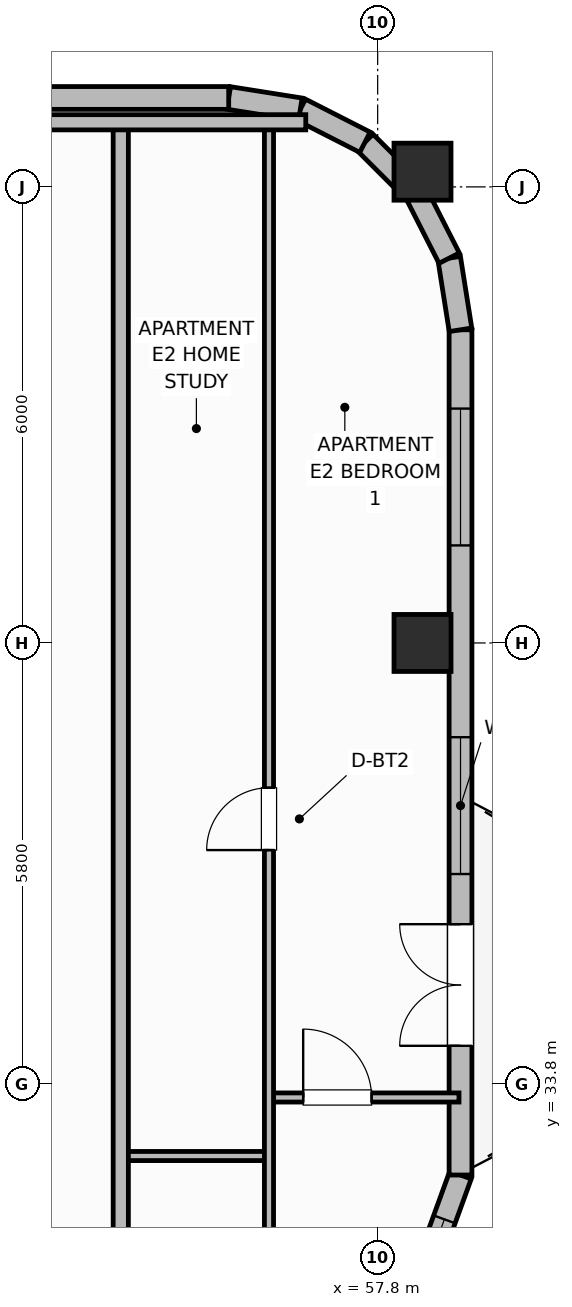
"""IFC4 building model, lengths in metres.
Left out: names, types, materials, properties, quantities, classifications, styles, units other than length and angle.
Written with IfcOpenShell. Run it as: python <this file> out.ifc"""

import sys

from ifc_helpers import new_model, si_unit, direction, frame, frame_2d, origin, origin_2d, place, context, subcontext, project, spatial, rectangle, extrude, element, fill, save


model = new_model("IFC4")
c1 = context("Model", 3, precision=1e-05, world=origin(), true_north=direction((0.0, 1.0)))
c2 = subcontext(c1, "Body", "Model", "MODEL_VIEW")
j1 = project(units=[si_unit("LENGTHUNIT", "METRE"), si_unit("PLANEANGLEUNIT", "RADIAN")], contexts=[c1])
p1 = place(None, origin())
s1 = spatial("IfcSite", under=j1, at=p1, CompositionType="ELEMENT")
p2 = place(p1, origin())
s2 = spatial("IfcBuilding", under=s1, at=p2, CompositionType="ELEMENT")
p3 = place(p2, frame((0.0, 0.0, 271.3)))
s3 = spatial("IfcBuildingStorey", under=s2, at=p3, CompositionType="ELEMENT", Elevation=271.3)
for number, where, z_axis, x_axis in (
    (1, (58.39, 39.6, 0.0), (0.0, 0.0, 1.0), (1.0, 0.0, 0.0)),
    (2, (58.39, 45.8, 0.0), (0.0, 0.0, 1.0), (1.0, 0.0, 0.0)),
):
    element("IfcColumn", number, at=place(p3, frame(where, z_axis=z_axis, x_axis=x_axis)), inside=s3, PredefinedType="COLUMN", context=c2, shape_type="SweptSolid", body=[
        extrude(rectangle(XDim=0.75, YDim=0.75, at=origin_2d()), origin(), (0.0, 0.0, 1.0), 3.7),
    ])
p4 = place(p3, frame((58.09, 30.4, 0.0), z_axis=(0.0, 0.0, 1.0), x_axis=(0.341642580708, 0.939829956453, 0.0)))
e3 = element("IfcWall", 3, at=p4, inside=s3, PredefinedType="SOLIDWALL", context=c2, shape_type="SweptSolid", body=[
    extrude(rectangle(XDim=2.341, YDim=0.3, at=frame_2d((1.17, 0.0))), origin(), (0.0, 0.0, 1.0), 2.73),
])
p5 = place(p4, frame((0.621, 0.0, 0.92)))
e4 = element("IfcOpeningElement", 4, at=p5, cuts=e3, PredefinedType="OPENING", context=c2, shape_type="SweptSolid", body=[
    extrude(rectangle(XDim=1.1, YDim=1.65, at=frame_2d((0.55, 0.825))), frame((0.0, 0.16, 0.0), z_axis=(0.0, -1.0, 0.0), x_axis=(1.0, 0.0, 0.0)), (0.0, 0.0, 1.0), 0.32),
])
p6 = place(p3, frame((58.89, 32.6, 0.0), z_axis=(0.0, 0.0, 1.0), x_axis=(0.0, 1.0, 0.0)))
e5 = element("IfcWall", 5, at=p6, inside=s3, PredefinedType="SOLIDWALL", context=c2, shape_type="SweptSolid", body=[
    extrude(rectangle(XDim=11.12, YDim=0.3, at=frame_2d((5.56, 0.0))), origin(), (0.0, 0.0, 1.0), 2.73),
])
p7 = place(p6, frame((1.7, 0.0, 0.0)))
e6 = element("IfcOpeningElement", 6, at=p7, cuts=e5, PredefinedType="OPENING", context=c2, shape_type="SweptSolid", body=[
    extrude(rectangle(XDim=1.6, YDim=2.1, at=frame_2d((0.8, 1.05))), frame((0.0, 0.16, 0.0), z_axis=(0.0, -1.0, 0.0), x_axis=(1.0, 0.0, 0.0)), (0.0, 0.0, 1.0), 0.32),
])
p8 = place(p6, frame((3.96, 0.0, 0.76)))
e7 = element("IfcOpeningElement", 7, at=p8, cuts=e5, PredefinedType="OPENING", context=c2, shape_type="SweptSolid", body=[
    extrude(rectangle(XDim=1.8, YDim=1.85, at=frame_2d((0.9, 0.925))), frame((0.0, 0.16, 0.0), z_axis=(0.0, -1.0, 0.0), x_axis=(1.0, 0.0, 0.0)), (0.0, 0.0, 1.0), 0.32),
])
p9 = place(p6, frame((8.283, 0.0, 0.76)))
e8 = element("IfcOpeningElement", 8, at=p9, cuts=e5, PredefinedType="OPENING", context=c2, shape_type="SweptSolid", body=[
    extrude(rectangle(XDim=1.8, YDim=1.85, at=frame_2d((0.9, 0.925))), frame((0.0, 0.16, 0.0), z_axis=(0.0, -1.0, 0.0), x_axis=(1.0, 0.0, 0.0)), (0.0, 0.0, 1.0), 0.32),
])
p10 = place(p3, frame((58.89, 43.72, 0.0), z_axis=(0.0, 0.0, 1.0), x_axis=(-0.156304114255, 0.987708977314, 0.0)))
e9 = element("IfcWall", 9, at=p10, inside=s3, PredefinedType="SOLIDWALL", context=c2, shape_type="SweptSolid", body=[
    extrude(rectangle(XDim=0.954, YDim=0.3, at=frame_2d((0.477, 0.0))), origin(), (0.0, 0.0, 1.0), 2.73),
])
p11 = place(p3, frame((58.741, 44.663, 0.0), z_axis=(0.0, 0.0, 1.0), x_axis=(-0.45395644796, 0.891023873617, 0.0)))
e10 = element("IfcWall", 10, at=p11, inside=s3, PredefinedType="SOLIDWALL", context=c2, shape_type="SweptSolid", body=[
    extrude(rectangle(XDim=0.954, YDim=0.3, at=frame_2d((0.477, 0.0))), origin(), (0.0, 0.0, 1.0), 2.73),
])
for number, where, z_axis, x_axis in (
    (11, (58.308, 45.513, 0.0), (0.0, 0.0, 1.0), (-0.707, 0.707, 0.0)),
    (12, (57.633, 46.188, 0.0), (0.0, 0.0, 1.0), (-0.891, 0.454, 0.0)),
):
    element("IfcWall", number, at=place(p3, frame(where, z_axis=z_axis, x_axis=x_axis)), inside=s3, PredefinedType="SOLIDWALL", context=c2, shape_type="SweptSolid", body=[
        extrude(rectangle(XDim=0.954, YDim=0.3, at=frame_2d((0.477, 0.0))), origin(), (0.0, 0.0, 1.0), 2.73),
    ])
p12 = place(p3, frame((56.782, 46.621, 0.0), z_axis=(0.0, 0.0, 1.0), x_axis=(-0.987663181641, 0.156593229835, 0.0)))
e13 = element("IfcWall", 13, at=p12, inside=s3, PredefinedType="SOLIDWALL", context=c2, shape_type="SweptSolid", body=[
    extrude(rectangle(XDim=0.954, YDim=0.3, at=frame_2d((0.477, 0.0))), origin(), (0.0, 0.0, 1.0), 2.73),
])
p13 = place(p3, frame((55.84, 46.77, 0.0), z_axis=(0.0, 0.0, 1.0), x_axis=(-1.0, 0.0, 0.0)))
e14 = element("IfcWall", 14, at=p13, inside=s3, PredefinedType="SOLIDWALL", context=c2, shape_type="SweptSolid", body=[
    extrude(rectangle(XDim=33.28, YDim=0.3, at=frame_2d((16.64, 0.0))), origin(), (0.0, 0.0, 1.0), 2.73),
])
p14 = place(p13, frame((4.647, 0.0, 0.71)))
e15 = element("IfcOpeningElement", 15, at=p14, cuts=e14, PredefinedType="OPENING", context=c2, shape_type="SweptSolid", body=[
    extrude(rectangle(XDim=1.6, YDim=1.9, at=frame_2d((0.8, 0.95))), frame((0.0, 0.16, 0.0), z_axis=(0.0, -1.0, 0.0), x_axis=(1.0, 0.0, 0.0)), (0.0, 0.0, 1.0), 0.32),
])
p15 = place(p13, frame((7.845, 0.0, 0.71)))
e16 = element("IfcOpeningElement", 16, at=p15, cuts=e14, PredefinedType="OPENING", context=c2, shape_type="SweptSolid", body=[
    extrude(rectangle(XDim=1.6, YDim=1.9, at=frame_2d((0.8, 0.95))), frame((0.0, 0.16, 0.0), z_axis=(0.0, -1.0, 0.0), x_axis=(1.0, 0.0, 0.0)), (0.0, 0.0, 1.0), 0.32),
])
p16 = place(p13, frame((14.241, 0.0, 0.71)))
e17 = element("IfcOpeningElement", 17, at=p16, cuts=e14, PredefinedType="OPENING", context=c2, shape_type="SweptSolid", body=[
    extrude(rectangle(XDim=1.6, YDim=1.9, at=frame_2d((0.8, 0.95))), frame((0.0, 0.16, 0.0), z_axis=(0.0, -1.0, 0.0), x_axis=(1.0, 0.0, 0.0)), (0.0, 0.0, 1.0), 0.32),
])
p17 = place(p13, frame((17.439, 0.0, 0.71)))
e18 = element("IfcOpeningElement", 18, at=p17, cuts=e14, PredefinedType="OPENING", context=c2, shape_type="SweptSolid", body=[
    extrude(rectangle(XDim=1.6, YDim=1.9, at=frame_2d((0.8, 0.95))), frame((0.0, 0.16, 0.0), z_axis=(0.0, -1.0, 0.0), x_axis=(1.0, 0.0, 0.0)), (0.0, 0.0, 1.0), 0.32),
])
p18 = place(p13, frame((23.835, 0.0, 0.71)))
e19 = element("IfcOpeningElement", 19, at=p18, cuts=e14, PredefinedType="OPENING", context=c2, shape_type="SweptSolid", body=[
    extrude(rectangle(XDim=1.6, YDim=1.9, at=frame_2d((0.8, 0.95))), frame((0.0, 0.16, 0.0), z_axis=(0.0, -1.0, 0.0), x_axis=(1.0, 0.0, 0.0)), (0.0, 0.0, 1.0), 0.32),
])
p19 = place(p13, frame((27.033, 0.0, 0.71)))
e20 = element("IfcOpeningElement", 20, at=p19, cuts=e14, PredefinedType="OPENING", context=c2, shape_type="SweptSolid", body=[
    extrude(rectangle(XDim=1.6, YDim=1.9, at=frame_2d((0.8, 0.95))), frame((0.0, 0.16, 0.0), z_axis=(0.0, -1.0, 0.0), x_axis=(1.0, 0.0, 0.0)), (0.0, 0.0, 1.0), 0.32),
])
p20 = place(p3, frame((54.42, 32.85, 0.0), z_axis=(0.0, 0.0, 1.0), x_axis=(1.0, 0.0, 0.0)))
e21 = element("IfcWall", 21, at=p20, inside=s3, PredefinedType="PARTITIONING", context=c2, shape_type="SweptSolid", body=[
    extrude(rectangle(XDim=1.95, YDim=0.12, at=frame_2d((0.975, 0.0))), origin(), (0.0, 0.0, 1.0), 2.56),
])
p21 = place(p3, frame((56.37, 33.62, 0.0), z_axis=(0.0, 0.0, 1.0), x_axis=(1.0, 0.0, 0.0)))
e22 = element("IfcWall", 22, at=p21, inside=s3, PredefinedType="PARTITIONING", context=c2, shape_type="SweptSolid", body=[
    extrude(rectangle(XDim=2.5, YDim=0.12, at=frame_2d((1.25, 0.0))), origin(), (0.0, 0.0, 1.0), 2.56),
])
p22 = place(p21, frame((0.45, 0.0, 0.0)))
e23 = element("IfcOpeningElement", 23, at=p22, cuts=e22, PredefinedType="OPENING", context=c2, shape_type="SweptSolid", body=[
    extrude(rectangle(XDim=0.9, YDim=2.1, at=frame_2d((0.45, 1.05))), frame((0.0, 0.07, 0.0), z_axis=(0.0, -1.0, 0.0), x_axis=(1.0, 0.0, 0.0)), (0.0, 0.0, 1.0), 0.14),
])
p23 = place(p3, frame((56.37, 23.69, 0.0), z_axis=(0.0, 0.0, 1.0), x_axis=(0.0, 1.0, 0.0)))
e24 = element("IfcWall", 24, at=p23, inside=s3, PredefinedType="PARTITIONING", context=c2, shape_type="SweptSolid", body=[
    extrude(rectangle(XDim=22.72, YDim=0.12, at=frame_2d((11.36, 0.0))), origin(), (0.0, 0.0, 1.0), 2.56),
])
p24 = place(p23, frame((0.41, 0.0, 0.0)))
e25 = element("IfcOpeningElement", 25, at=p24, cuts=e24, PredefinedType="OPENING", context=c2, shape_type="SweptSolid", body=[
    extrude(rectangle(XDim=0.9, YDim=2.1, at=frame_2d((0.45, 1.05))), frame((0.0, 0.07, 0.0), z_axis=(0.0, -1.0, 0.0), x_axis=(1.0, 0.0, 0.0)), (0.0, 0.0, 1.0), 0.14),
])
p25 = place(p23, frame((13.185, 0.0, 0.0)))
e26 = element("IfcOpeningElement", 26, at=p25, cuts=e24, PredefinedType="OPENING", context=c2, shape_type="SweptSolid", body=[
    extrude(rectangle(XDim=0.82, YDim=2.08, at=frame_2d((0.41, 1.04))), frame((0.0, 0.07, 0.0), z_axis=(0.0, -1.0, 0.0), x_axis=(1.0, 0.0, 0.0)), (0.0, 0.0, 1.0), 0.14),
])
p26 = place(p3, frame((54.42, 9.95, 0.0), z_axis=(0.0, 0.0, 1.0), x_axis=(0.0, 1.0, 0.0)))
e27 = element("IfcWall", 27, at=p26, inside=s3, PredefinedType="PARTITIONING", context=c2, shape_type="SweptSolid", body=[
    extrude(rectangle(XDim=36.5, YDim=0.2, at=frame_2d((18.25, 0.0))), origin(), (0.0, 0.0, 1.0), 2.56),
])
p27 = place(p26, frame((3.25, 0.0, 0.0)))
e28 = element("IfcOpeningElement", 28, at=p27, cuts=e27, PredefinedType="OPENING", context=c2, shape_type="SweptSolid", body=[
    extrude(rectangle(XDim=1.0, YDim=2.15, at=frame_2d((0.5, 1.075))), frame((0.0, 0.11, 0.0), z_axis=(0.0, -1.0, 0.0), x_axis=(1.0, 0.0, 0.0)), (0.0, 0.0, 1.0), 0.22),
])
p28 = place(p26, frame((14.25, 0.0, 0.0)))
e29 = element("IfcOpeningElement", 29, at=p28, cuts=e27, PredefinedType="OPENING", context=c2, shape_type="SweptSolid", body=[
    extrude(rectangle(XDim=1.0, YDim=2.15, at=frame_2d((0.5, 1.075))), frame((0.0, 0.11, 0.0), z_axis=(0.0, -1.0, 0.0), x_axis=(1.0, 0.0, 0.0)), (0.0, 0.0, 1.0), 0.22),
])
p29 = place(p3, frame((53.1, 46.45, 0.0), z_axis=(0.0, 0.0, 1.0), x_axis=(1.0, 0.0, 0.0)))
e30 = element("IfcWall", 30, at=p29, inside=s3, PredefinedType="PARTITIONING", context=c2, shape_type="SweptSolid", body=[
    extrude(rectangle(XDim=3.754, YDim=0.2, at=frame_2d((1.877, 0.0))), origin(), (0.0, 0.0, 1.0), 2.56),
])
p30 = place(p5, origin())
e31 = element("IfcWindow", 31, at=p30, inside=s3, PartitioningType="SINGLE_PANEL", PredefinedType="WINDOW", context=c2, shape_type="SweptSolid", body=[
    extrude(rectangle(XDim=1.1, YDim=1.65, at=frame_2d((0.55, 0.825))), frame((0.0, 0.03, 0.0), z_axis=(0.0, -1.0, 0.0), x_axis=(1.0, 0.0, 0.0)), (0.0, 0.0, 1.0), 0.06),
])
fill(e4, e31)
p31 = place(p7, origin())
e32 = element("IfcDoor", 32, at=p31, inside=s3, OperationType="DOUBLE_DOOR_SINGLE_SWING", PredefinedType="DOOR", context=c2, shape_type="SweptSolid", body=[
    extrude(rectangle(XDim=1.6, YDim=2.1, at=frame_2d((0.8, 1.05))), frame((0.0, 0.025, 0.0), z_axis=(0.0, -1.0, 0.0), x_axis=(1.0, 0.0, 0.0)), (0.0, 0.0, 1.0), 0.05),
])
fill(e6, e32)
p32 = place(p8, origin())
e33 = element("IfcWindow", 33, at=p32, inside=s3, PartitioningType="SINGLE_PANEL", PredefinedType="WINDOW", context=c2, shape_type="SweptSolid", body=[
    extrude(rectangle(XDim=1.8, YDim=1.85, at=frame_2d((0.9, 0.925))), frame((0.0, 0.03, 0.0), z_axis=(0.0, -1.0, 0.0), x_axis=(1.0, 0.0, 0.0)), (0.0, 0.0, 1.0), 0.06),
])
fill(e7, e33)
p33 = place(p9, origin())
e34 = element("IfcWindow", 34, at=p33, inside=s3, PartitioningType="SINGLE_PANEL", PredefinedType="WINDOW", context=c2, shape_type="SweptSolid", body=[
    extrude(rectangle(XDim=1.8, YDim=1.85, at=frame_2d((0.9, 0.925))), frame((0.0, 0.03, 0.0), z_axis=(0.0, -1.0, 0.0), x_axis=(1.0, 0.0, 0.0)), (0.0, 0.0, 1.0), 0.06),
])
fill(e8, e34)
p34 = place(p22, origin())
e35 = element("IfcDoor", 35, at=p34, inside=s3, OperationType="SINGLE_SWING_LEFT", PredefinedType="DOOR", context=c2, shape_type="SweptSolid", body=[
    extrude(rectangle(XDim=0.9, YDim=2.1, at=frame_2d((0.45, 1.05))), frame((0.0, 0.025, 0.0), z_axis=(0.0, -1.0, 0.0), x_axis=(1.0, 0.0, 0.0)), (0.0, 0.0, 1.0), 0.05),
])
fill(e23, e35)
p35 = place(p25, origin())
e36 = element("IfcDoor", 36, at=p35, inside=s3, OperationType="SINGLE_SWING_LEFT", PredefinedType="DOOR", context=c2, shape_type="SweptSolid", body=[
    extrude(rectangle(XDim=0.82, YDim=2.08, at=frame_2d((0.41, 1.04))), frame((0.0, 0.025, 0.0), z_axis=(0.0, -1.0, 0.0), x_axis=(1.0, 0.0, 0.0)), (0.0, 0.0, 1.0), 0.05),
])
fill(e26, e36)
save(model, sys.argv[1])
